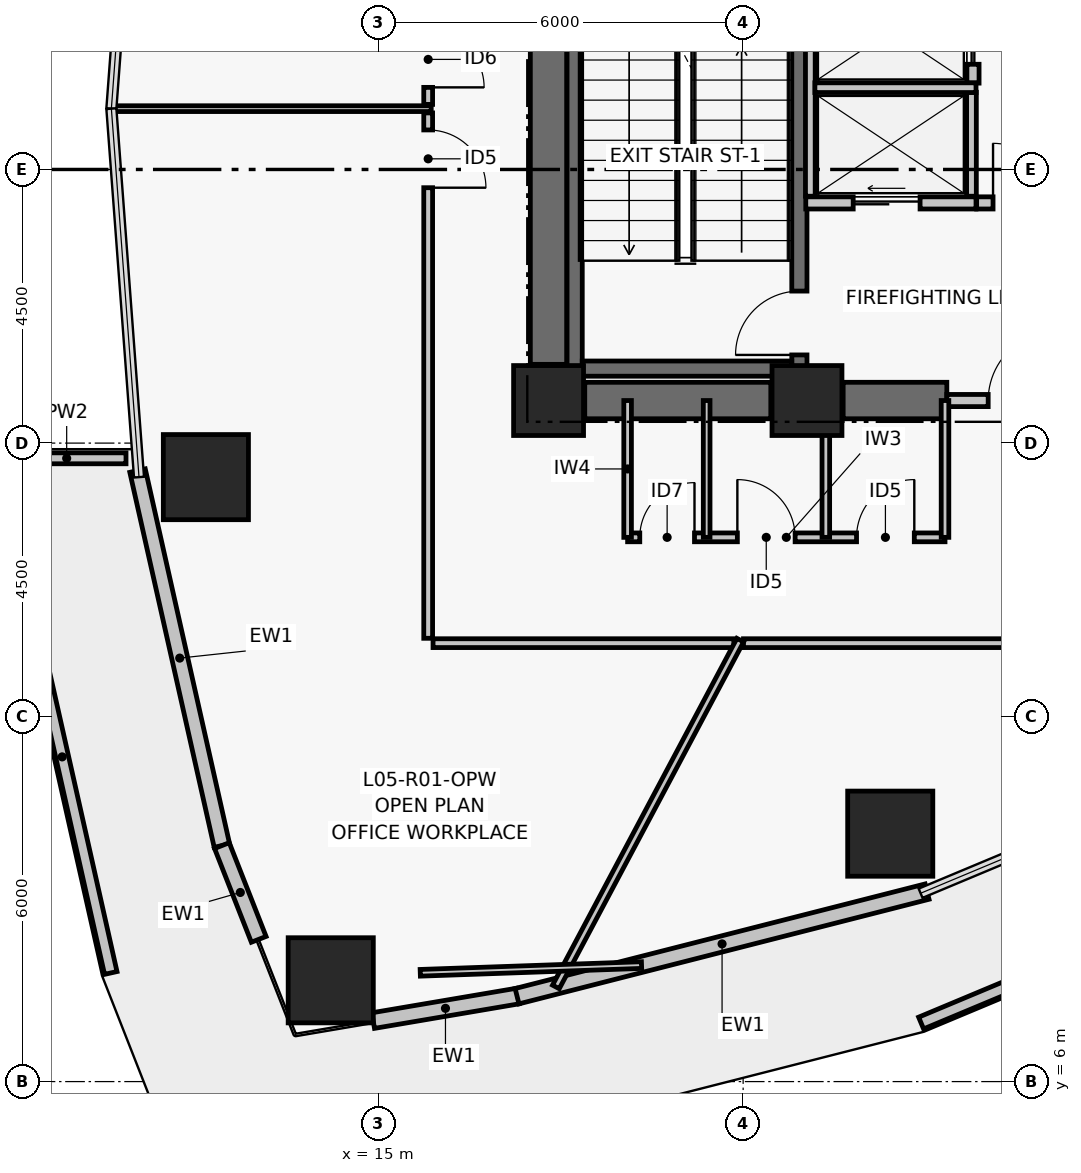
"""IFC4 building model, lengths in metres.
Left out: names, types, materials, properties, quantities, classifications, styles, units other than length and angle.
Written with IfcOpenShell. Run it as: python <this file> out.ifc"""

import sys

from ifc_helpers import new_model, si_unit, direction, frame, frame_2d, origin, origin_2d, place, context, subcontext, project, spatial, rectangle, hollow_rectangle, extrude, element, fill, save


model = new_model("IFC4")
c1 = context("Model", 3, precision=1e-05, world=origin(), true_north=direction((0.0, 1.0)))
c2 = subcontext(c1, "Body", "Model", "MODEL_VIEW")
j1 = project(units=[si_unit("LENGTHUNIT", "METRE"), si_unit("PLANEANGLEUNIT", "RADIAN")], contexts=[c1])
p1 = place(None, origin())
s1 = spatial("IfcSite", under=j1, at=p1, CompositionType="ELEMENT")
p2 = place(p1, origin())
s2 = spatial("IfcBuilding", under=s1, at=p2, CompositionType="ELEMENT")
p3 = place(p2, frame((0.0, 0.0, 27.6)))
s3 = spatial("IfcBuildingStorey", under=s2, at=p3, CompositionType="ELEMENT", Elevation=27.6)
for number, where, z_axis, x_axis in (
    (1, (17.8, 17.2, 0.0), (0.0, 0.0, 1.0), (1.0, 0.0, 0.0)),
    (2, (22.05, 17.2, 0.0), (0.0, 0.0, 1.0), (1.0, 0.0, 0.0)),
):
    element("IfcColumn", number, at=place(p3, frame(where, z_axis=z_axis, x_axis=x_axis)), inside=s3, PredefinedType="COLUMN", context=c2, shape_type="SweptSolid", body=[
        extrude(rectangle(XDim=1.15, YDim=1.15, at=origin_2d()), origin(), (0.0, 0.0, 1.0), 3.72),
    ])
p4 = place(p3, frame((18.395, 17.2, 0.0), z_axis=(0.0, 0.0, 1.0), x_axis=(1.0, 0.0, 0.0)))
e3 = element("IfcWall", 3, at=p4, inside=s3, PredefinedType="SHEAR", context=c2, shape_type="SweptSolid", body=[
    extrude(rectangle(XDim=3.06, YDim=0.6, at=frame_2d((1.53, 0.0))), origin(), (0.0, 0.0, 1.0), 3.47),
])
p5 = place(p3, frame((22.645, 17.2, 0.0), z_axis=(0.0, 0.0, 1.0), x_axis=(1.0, 0.0, 0.0)))
e4 = element("IfcWall", 4, at=p5, inside=s3, PredefinedType="SHEAR", context=c2, shape_type="SweptSolid", body=[
    extrude(rectangle(XDim=1.705, YDim=0.6, at=frame_2d((0.853, 0.0))), origin(), (0.0, 0.0, 1.0), 3.47),
])
p6 = place(p3, frame((17.8, 17.795, 0.0), z_axis=(0.0, 0.0, 1.0), x_axis=(0.0, 1.0, 0.0)))
e5 = element("IfcWall", 5, at=p6, inside=s3, PredefinedType="SHEAR", context=c2, shape_type="SweptSolid", body=[
    extrude(rectangle(XDim=8.41, YDim=0.6, at=frame_2d((4.205, 0.0))), origin(), (0.0, 0.0, 1.0), 3.47),
])
p7 = place(p3, frame((18.229, 17.6, 0.0), z_axis=(0.0, 0.0, 1.0), x_axis=(0.0, 1.0, 0.0)))
e6 = element("IfcWall", 6, at=p7, inside=s3, PredefinedType="SHEAR", context=c2, shape_type="SweptSolid", body=[
    extrude(rectangle(XDim=8.8, YDim=0.25, at=frame_2d((4.4, 0.0))), origin(), (0.0, 0.0, 1.0), 3.47),
])
p8 = place(p3, frame((21.925, 17.6, 0.0), z_axis=(0.0, 0.0, 1.0), x_axis=(0.0, 1.0, 0.0)))
e7 = element("IfcWall", 7, at=p8, inside=s3, PredefinedType="SHEAR", context=c2, shape_type="SweptSolid", body=[
    extrude(rectangle(XDim=8.8, YDim=0.25, at=frame_2d((4.4, 0.0))), origin(), (0.0, 0.0, 1.0), 3.47),
])
p9 = place(p8, frame((0.35, 0.0, 0.0)))
e8 = element("IfcOpeningElement", 8, at=p9, cuts=e7, PredefinedType="OPENING", context=c2, shape_type="SweptSolid", body=[
    extrude(rectangle(XDim=1.05, YDim=2.08, at=frame_2d((0.525, 1.04))), frame((0.0, 0.135, 0.0), z_axis=(0.0, -1.0, 0.0), x_axis=(1.0, 0.0, 0.0)), (0.0, 0.0, 1.0), 0.27),
])
p10 = place(p3, frame((18.354, 17.725, 0.0), z_axis=(0.0, 0.0, 1.0), x_axis=(1.0, 0.0, 0.0)))
e9 = element("IfcWall", 9, at=p10, inside=s3, PredefinedType="SHEAR", context=c2, shape_type="SweptSolid", body=[
    extrude(rectangle(XDim=3.446, YDim=0.25, at=frame_2d((1.723, 0.0))), origin(), (0.0, 0.0, 1.0), 3.47),
])
for number, where, z_axis, x_axis in (
    (10, (12.164, 15.94, 0.0), (0.0, 0.0, 1.0), (1.0, 0.0, 0.0)),
    (11, (14.218, 7.666, 0.0), (0.0, 0.0, 1.0), (1.0, 0.0, 0.0)),
    (12, (23.419, 10.077, 0.0), (0.0, 0.0, 1.0), (1.0, 0.0, 0.0)),
):
    element("IfcColumn", number, at=place(p3, frame(where, z_axis=z_axis, x_axis=x_axis)), inside=s3, PredefinedType="COLUMN", context=c2, shape_type="SweptSolid", body=[
        extrude(hollow_rectangle(XDim=1.4, YDim=1.4, WallThickness=0.055, at=origin_2d()), origin(), (0.0, 0.0, 1.0), 3.72),
    ])
p11 = place(p3, frame((12.427, 9.881, 0.0), z_axis=(0.0, 0.0, 1.0), x_axis=(-0.219502085231, 0.975612030768, 0.0)))
e13 = element("IfcWall", 13, at=p11, inside=s3, PredefinedType="PARTITIONING", context=c2, shape_type="SweptSolid", body=[
    extrude(rectangle(XDim=6.321, YDim=0.26, at=frame_2d((3.16, 0.0))), origin(), (0.0, 0.0, 1.0), 3.47),
])
p12 = place(p3, frame((13.033, 8.339, 0.0), z_axis=(0.0, 0.0, 1.0), x_axis=(-0.365666052462, 0.930746119023, 0.0)))
e14 = element("IfcWall", 14, at=p12, inside=s3, PredefinedType="PARTITIONING", context=c2, shape_type="SweptSolid", body=[
    extrude(rectangle(XDim=1.656, YDim=0.26, at=frame_2d((0.828, 0.0))), origin(), (0.0, 0.0, 1.0), 3.47),
])
p13 = place(p3, frame((17.293, 7.407, 0.0), z_axis=(0.0, 0.0, 1.0), x_axis=(-0.985905469923, -0.167303330437, 0.0)))
e15 = element("IfcWall", 15, at=p13, inside=s3, PredefinedType="PARTITIONING", context=c2, shape_type="SweptSolid", body=[
    extrude(rectangle(XDim=2.412, YDim=0.26, at=frame_2d((1.206, 0.0))), origin(), (0.0, 0.0, 1.0), 3.47),
])
p14 = place(p3, frame((24.025, 9.124, 0.0), z_axis=(0.0, 0.0, 1.0), x_axis=(-0.968977974408, -0.247147092057, 0.0)))
e16 = element("IfcWall", 16, at=p14, inside=s3, PredefinedType="PARTITIONING", context=c2, shape_type="SweptSolid", body=[
    extrude(rectangle(XDim=6.959, YDim=0.26, at=frame_2d((3.479, 0.0))), origin(), (0.0, 0.0, 1.0), 3.47),
])
p15 = place(p3, frame((31.173, 9.993, 0.0), z_axis=(0.0, 0.0, 1.0), x_axis=(-0.922553724433, -0.385868663582, 0.0)))
e17 = element("IfcWall", 17, at=p15, inside=s3, PredefinedType="PARAPET", context=c2, shape_type="SweptSolid", body=[
    extrude(rectangle(XDim=7.854, YDim=0.21, at=frame_2d((3.927, 0.0))), origin(), (0.0, 0.0, 1.0), 1.15),
])
p16 = place(p3, frame((10.6, 7.786, 0.0), z_axis=(0.0, 0.0, 1.0), x_axis=(-0.219520170018, 0.975607961712, 0.0)))
e18 = element("IfcWall", 18, at=p16, inside=s3, PredefinedType="PARAPET", context=c2, shape_type="SweptSolid", body=[
    extrude(rectangle(XDim=7.285, YDim=0.21, at=frame_2d((3.642, 0.0))), origin(), (0.0, 0.0, 1.0), 1.15),
])
p17 = place(p3, frame((8.899, 16.25, 0.0), z_axis=(0.0, 0.0, 1.0), x_axis=(1.0, 0.0, 0.0)))
e19 = element("IfcWall", 19, at=p17, inside=s3, PredefinedType="PARAPET", context=c2, shape_type="SweptSolid", body=[
    extrude(rectangle(XDim=1.951, YDim=0.18, at=frame_2d((0.976, 0.0))), origin(), (0.0, 0.0, 1.0), 1.15),
])
p18 = place(p3, frame((24.35, 17.2, 0.0), z_axis=(0.0, 0.0, 1.0), x_axis=(1.0, 0.0, 0.0)))
e20 = element("IfcWall", 20, at=p18, inside=s3, PredefinedType="PARTITIONING", context=c2, shape_type="SweptSolid", body=[
    extrude(rectangle(XDim=2.5, YDim=0.2, at=frame_2d((1.25, 0.0))), origin(), (0.0, 0.0, 1.0), 2.6),
])
p19 = place(p18, frame((0.68, 0.0, 0.0)))
e21 = element("IfcOpeningElement", 21, at=p19, cuts=e20, PredefinedType="OPENING", context=c2, shape_type="SweptSolid", body=[
    extrude(rectangle(XDim=1.15, YDim=2.08, at=frame_2d((0.575, 1.04))), frame((0.0, 0.11, 0.0), z_axis=(0.0, -1.0, 0.0), x_axis=(1.0, 0.0, 0.0)), (0.0, 0.0, 1.0), 0.22),
])
p20 = place(p3, frame((24.84, 20.45, 0.0), z_axis=(0.0, 0.0, 1.0), x_axis=(1.0, 0.0, 0.0)))
e22 = element("IfcWall", 22, at=p20, inside=s3, PredefinedType="PARTITIONING", context=c2, shape_type="SweptSolid", body=[
    extrude(rectangle(XDim=1.52, YDim=0.2, at=frame_2d((0.76, 0.0))), origin(), (0.0, 0.0, 1.0), 3.47),
])
p21 = place(p20, frame((0.27, 0.0, 0.0)))
e23 = element("IfcOpeningElement", 23, at=p21, cuts=e22, PredefinedType="OPENING", context=c2, shape_type="SweptSolid", body=[
    extrude(rectangle(XDim=0.98, YDim=2.06, at=frame_2d((0.49, 1.03))), frame((0.0, 0.11, 0.0), z_axis=(0.0, -1.0, 0.0), x_axis=(1.0, 0.0, 0.0)), (0.0, 0.0, 1.0), 0.22),
])
p22 = place(p3, frame((22.03, 20.45, 0.0), z_axis=(0.0, 0.0, 1.0), x_axis=(1.0, 0.0, 0.0)))
e24 = element("IfcWall", 24, at=p22, inside=s3, PredefinedType="PARTITIONING", context=c2, shape_type="SweptSolid", body=[
    extrude(rectangle(XDim=2.8, YDim=0.2, at=frame_2d((1.4, 0.0))), origin(), (0.0, 0.0, 1.0), 3.47),
])
p23 = place(p22, frame((0.78, 0.0, 0.0)))
e25 = element("IfcOpeningElement", 25, at=p23, cuts=e24, PredefinedType="OPENING", context=c2, shape_type="SweptSolid", body=[
    extrude(rectangle(XDim=1.1, YDim=2.08, at=frame_2d((0.55, 1.04))), frame((0.0, 0.11, 0.0), z_axis=(0.0, -1.0, 0.0), x_axis=(1.0, 0.0, 0.0)), (0.0, 0.0, 1.0), 0.22),
])
p24 = place(p3, frame((24.78, 22.42, 0.0), z_axis=(0.0, 0.0, 1.0), x_axis=(0.0, 1.0, 0.0)))
e26 = element("IfcWall", 26, at=p24, inside=s3, PredefinedType="PARTITIONING", context=c2, shape_type="SweptSolid", body=[
    extrude(rectangle(XDim=1.72, YDim=0.2, at=frame_2d((0.86, 0.0))), origin(), (0.0, 0.0, 1.0), 3.47),
])
p25 = place(p24, frame((0.31, 0.0, 0.0)))
e27 = element("IfcOpeningElement", 27, at=p25, cuts=e26, PredefinedType="OPENING", context=c2, shape_type="SweptSolid", body=[
    extrude(rectangle(XDim=1.1, YDim=2.08, at=frame_2d((0.55, 1.04))), frame((0.0, 0.11, 0.0), z_axis=(0.0, -1.0, 0.0), x_axis=(1.0, 0.0, 0.0)), (0.0, 0.0, 1.0), 0.22),
])
p26 = place(p3, frame((22.105, 20.56, 0.0), z_axis=(0.0, 0.0, 1.0), x_axis=(0.0, 1.0, 0.0)))
e28 = element("IfcWall", 28, at=p26, inside=s3, PredefinedType="PARTITIONING", context=c2, shape_type="SweptSolid", body=[
    extrude(rectangle(XDim=5.45, YDim=0.16, at=frame_2d((2.725, 0.0))), origin(), (0.0, 0.0, 1.0), 3.47),
])
p27 = place(p3, frame((24.755, 20.56, 0.0), z_axis=(0.0, 0.0, 1.0), x_axis=(0.0, 1.0, 0.0)))
e29 = element("IfcWall", 29, at=p27, inside=s3, PredefinedType="PARTITIONING", context=c2, shape_type="SweptSolid", body=[
    extrude(rectangle(XDim=1.71, YDim=0.16, at=frame_2d((0.855, 0.0))), origin(), (0.0, 0.0, 1.0), 3.47),
])
p28 = place(p3, frame((22.18, 22.345, 0.0), z_axis=(0.0, 0.0, 1.0), x_axis=(1.0, 0.0, 0.0)))
e30 = element("IfcWall", 30, at=p28, inside=s3, PredefinedType="PARTITIONING", context=c2, shape_type="SweptSolid", body=[
    extrude(rectangle(XDim=2.65, YDim=0.16, at=frame_2d((1.325, 0.0))), origin(), (0.0, 0.0, 1.0), 3.47),
])
p29 = place(p3, frame((19.1, 14.95, 0.0), z_axis=(0.0, 0.0, 1.0), x_axis=(1.0, 0.0, 0.0)))
e31 = element("IfcWall", 31, at=p29, inside=s3, PredefinedType="PARTITIONING", context=c2, shape_type="SweptSolid", body=[
    extrude(rectangle(XDim=5.22, YDim=0.145, at=frame_2d((2.61, 0.0))), origin(), (0.0, 0.0, 1.0), 2.6),
])
p30 = place(p29, frame((0.2, 0.0, 0.0)))
e32 = element("IfcOpeningElement", 32, at=p30, cuts=e31, PredefinedType="OPENING", context=c2, shape_type="SweptSolid", body=[
    extrude(rectangle(XDim=0.9, YDim=2.02, at=frame_2d((0.45, 1.01))), frame((0.0, 0.083, 0.0), z_axis=(0.0, -1.0, 0.0), x_axis=(1.0, 0.0, 0.0)), (0.0, 0.0, 1.0), 0.165),
])
p31 = place(p29, frame((1.805, 0.0, 0.0)))
e33 = element("IfcOpeningElement", 33, at=p31, cuts=e31, PredefinedType="OPENING", context=c2, shape_type="SweptSolid", body=[
    extrude(rectangle(XDim=0.95, YDim=2.06, at=frame_2d((0.475, 1.03))), frame((0.0, 0.083, 0.0), z_axis=(0.0, -1.0, 0.0), x_axis=(1.0, 0.0, 0.0)), (0.0, 0.0, 1.0), 0.165),
])
p32 = place(p29, frame((3.765, 0.0, 0.0)))
e34 = element("IfcOpeningElement", 34, at=p32, cuts=e31, PredefinedType="OPENING", context=c2, shape_type="SweptSolid", body=[
    extrude(rectangle(XDim=0.95, YDim=2.06, at=frame_2d((0.475, 1.03))), frame((0.0, 0.083, 0.0), z_axis=(0.0, -1.0, 0.0), x_axis=(1.0, 0.0, 0.0)), (0.0, 0.0, 1.0), 0.165),
])
p33 = place(p3, frame((19.1, 14.95, 0.0), z_axis=(0.0, 0.0, 1.0), x_axis=(0.0, 1.0, 0.0)))
e35 = element("IfcWall", 35, at=p33, inside=s3, PredefinedType="PARTITIONING", context=c2, shape_type="SweptSolid", body=[
    extrude(rectangle(XDim=2.25, YDim=0.125, at=frame_2d((1.125, 0.0))), origin(), (0.0, 0.0, 1.0), 2.6),
])
p34 = place(p3, frame((20.4, 14.95, 0.0), z_axis=(0.0, 0.0, 1.0), x_axis=(0.0, 1.0, 0.0)))
e36 = element("IfcWall", 36, at=p34, inside=s3, PredefinedType="PARTITIONING", context=c2, shape_type="SweptSolid", body=[
    extrude(rectangle(XDim=2.25, YDim=0.11, at=frame_2d((1.125, 0.0))), origin(), (0.0, 0.0, 1.0), 2.6),
])
for number, where, z_axis, x_axis in (
    (37, (22.36, 14.95, 0.0), (0.0, 0.0, 1.0), (0.0, 1.0, 0.0)),
    (38, (24.32, 14.95, 0.0), (0.0, 0.0, 1.0), (0.0, 1.0, 0.0)),
):
    element("IfcWall", number, at=place(p3, frame(where, z_axis=z_axis, x_axis=x_axis)), inside=s3, PredefinedType="PARTITIONING", context=c2, shape_type="SweptSolid", body=[
        extrude(rectangle(XDim=2.25, YDim=0.125, at=frame_2d((1.125, 0.0))), origin(), (0.0, 0.0, 1.0), 2.6),
    ])
p35 = place(p3, frame((15.82, 21.93, 0.0), z_axis=(0.0, 0.0, 1.0), x_axis=(0.0, -1.0, 0.0)))
e39 = element("IfcWall", 39, at=p35, inside=s3, PredefinedType="PARTITIONING", context=c2, shape_type="SweptSolid", body=[
    extrude(rectangle(XDim=8.64, YDim=0.145, at=frame_2d((4.32, 0.0))), origin(), (0.0, 0.0, 1.0), 2.6),
])
p36 = place(p35, frame((0.28, 0.0, 0.0)))
e40 = element("IfcOpeningElement", 40, at=p36, cuts=e39, PredefinedType="OPENING", context=c2, shape_type="SweptSolid", body=[
    extrude(rectangle(XDim=0.95, YDim=2.06, at=frame_2d((0.475, 1.03))), frame((0.0, 0.083, 0.0), z_axis=(0.0, -1.0, 0.0), x_axis=(1.0, 0.0, 0.0)), (0.0, 0.0, 1.0), 0.165),
])
p37 = place(p3, frame((15.9, 13.21, 0.0), z_axis=(0.0, 0.0, 1.0), x_axis=(1.0, 0.0, 0.0)))
e41 = element("IfcWall", 41, at=p37, inside=s3, PredefinedType="PARTITIONING", context=c2, shape_type="SweptSolid", body=[
    extrude(rectangle(XDim=4.947, YDim=0.145, at=frame_2d((2.474, 0.0))), origin(), (0.0, 0.0, 1.0), 2.6),
])
p38 = place(p3, frame((21.006, 13.21, 0.0), z_axis=(0.0, 0.0, 1.0), x_axis=(1.0, 0.0, 0.0)))
e42 = element("IfcWall", 42, at=p38, inside=s3, PredefinedType="PARTITIONING", context=c2, shape_type="SweptSolid", body=[
    extrude(rectangle(XDim=10.144, YDim=0.145, at=frame_2d((5.072, 0.0))), origin(), (0.0, 0.0, 1.0), 2.6),
])
p39 = place(p38, frame((5.677, 0.0, 0.0)))
e43 = element("IfcOpeningElement", 43, at=p39, cuts=e42, PredefinedType="OPENING", context=c2, shape_type="SweptSolid", body=[
    extrude(rectangle(XDim=0.95, YDim=2.06, at=frame_2d((0.475, 1.03))), frame((0.0, 0.083, 0.0), z_axis=(0.0, -1.0, 0.0), x_axis=(1.0, 0.0, 0.0)), (0.0, 0.0, 1.0), 0.165),
])
p40 = place(p3, frame((15.82, 28.7, 0.0), z_axis=(0.0, 0.0, 1.0), x_axis=(0.0, -1.0, 0.0)))
e44 = element("IfcWall", 44, at=p40, inside=s3, PredefinedType="PARTITIONING", context=c2, shape_type="SweptSolid", body=[
    extrude(rectangle(XDim=6.63, YDim=0.145, at=frame_2d((3.315, 0.0))), origin(), (0.0, 0.0, 1.0), 2.6),
])
p41 = place(p40, frame((5.43, 0.0, 0.0)))
e45 = element("IfcOpeningElement", 45, at=p41, cuts=e44, PredefinedType="OPENING", context=c2, shape_type="SweptSolid", body=[
    extrude(rectangle(XDim=0.92, YDim=2.05, at=frame_2d((0.46, 1.025))), frame((0.0, 0.083, 0.0), z_axis=(0.0, -1.0, 0.0), x_axis=(1.0, 0.0, 0.0)), (0.0, 0.0, 1.0), 0.165),
])
p42 = place(p3, frame((15.87, 22.0, 0.0), z_axis=(0.0, 0.0, 1.0), x_axis=(-1.0, 0.0, 0.0)))
e46 = element("IfcWall", 46, at=p42, inside=s3, PredefinedType="PARTITIONING", context=c2, shape_type="SweptSolid", body=[
    extrude(rectangle(XDim=5.271, YDim=0.095, at=frame_2d((2.635, 0.0))), origin(), (0.0, 0.0, 1.0), 2.85),
])
p43 = place(p3, frame((20.953, 13.26, 0.0), z_axis=(0.0, 0.0, 1.0), x_axis=(-0.469479450278, -0.88294339896, 0.0)))
e47 = element("IfcWall", 47, at=p43, inside=s3, PredefinedType="PARTITIONING", context=c2, shape_type="SweptSolid", body=[
    extrude(rectangle(XDim=6.459, YDim=0.125, at=frame_2d((3.229, 0.0))), origin(), (0.0, 0.0, 1.0), 2.85),
])
p44 = place(p3, frame((15.69, 7.789, 0.0), z_axis=(0.0, 0.0, 1.0), x_axis=(0.999389725088, 0.03493103762, 0.0)))
e48 = element("IfcWall", 48, at=p44, inside=s3, PredefinedType="PARTITIONING", context=c2, shape_type="SweptSolid", body=[
    extrude(rectangle(XDim=3.641, YDim=0.11, at=frame_2d((1.821, 0.0))), origin(), (0.0, 0.0, 1.0), 3.47),
])
p45 = place(p9, origin())
e49 = element("IfcDoor", 49, at=p45, inside=s3, OperationType="SINGLE_SWING_LEFT", PredefinedType="DOOR", context=c2, shape_type="SweptSolid", body=[
    extrude(rectangle(XDim=1.05, YDim=2.08, at=frame_2d((0.525, 1.04))), frame((0.0, 0.025, 0.0), z_axis=(0.0, -1.0, 0.0), x_axis=(1.0, 0.0, 0.0)), (0.0, 0.0, 1.0), 0.05),
])
fill(e8, e49)
p46 = place(p19, origin())
e50 = element("IfcDoor", 50, at=p46, inside=s3, OperationType="SINGLE_SWING_RIGHT", PredefinedType="DOOR", context=c2, shape_type="SweptSolid", body=[
    extrude(rectangle(XDim=1.15, YDim=2.08, at=frame_2d((0.575, 1.04))), frame((0.0, 0.025, 0.0), z_axis=(0.0, -1.0, 0.0), x_axis=(1.0, 0.0, 0.0)), (0.0, 0.0, 1.0), 0.05),
])
fill(e21, e50)
p47 = place(p21, origin())
e51 = element("IfcDoor", 51, at=p47, inside=s3, OperationType="SINGLE_SWING_LEFT", PredefinedType="DOOR", context=c2, shape_type="SweptSolid", body=[
    extrude(rectangle(XDim=0.98, YDim=2.06, at=frame_2d((0.49, 1.03))), frame((0.0, 0.025, 0.0), z_axis=(0.0, -1.0, 0.0), x_axis=(1.0, 0.0, 0.0)), (0.0, 0.0, 1.0), 0.05),
])
fill(e23, e51)
p48 = place(p23, origin())
e52 = element("IfcDoor", 52, at=p48, inside=s3, OperationType="DOUBLE_DOOR_SLIDING", PredefinedType="DOOR", context=c2, shape_type="SweptSolid", body=[
    extrude(rectangle(XDim=1.1, YDim=2.08, at=frame_2d((0.55, 1.04))), frame((0.0, 0.025, 0.0), z_axis=(0.0, -1.0, 0.0), x_axis=(1.0, 0.0, 0.0)), (0.0, 0.0, 1.0), 0.05),
])
fill(e25, e52)
p49 = place(p25, origin())
e53 = element("IfcDoor", 53, at=p49, inside=s3, OperationType="DOUBLE_DOOR_SLIDING", PredefinedType="DOOR", context=c2, shape_type="SweptSolid", body=[
    extrude(rectangle(XDim=1.1, YDim=2.08, at=frame_2d((0.55, 1.04))), frame((0.0, 0.025, 0.0), z_axis=(0.0, -1.0, 0.0), x_axis=(1.0, 0.0, 0.0)), (0.0, 0.0, 1.0), 0.05),
])
fill(e27, e53)
p50 = place(p30, origin())
e54 = element("IfcDoor", 54, at=p50, inside=s3, OperationType="SINGLE_SWING_RIGHT", PredefinedType="DOOR", context=c2, shape_type="SweptSolid", body=[
    extrude(rectangle(XDim=0.9, YDim=2.02, at=frame_2d((0.45, 1.01))), frame((0.0, 0.025, 0.0), z_axis=(0.0, -1.0, 0.0), x_axis=(1.0, 0.0, 0.0)), (0.0, 0.0, 1.0), 0.05),
])
fill(e32, e54)
p51 = place(p31, origin())
e55 = element("IfcDoor", 55, at=p51, inside=s3, OperationType="SINGLE_SWING_LEFT", PredefinedType="DOOR", context=c2, shape_type="SweptSolid", body=[
    extrude(rectangle(XDim=0.95, YDim=2.06, at=frame_2d((0.475, 1.03))), frame((0.0, 0.025, 0.0), z_axis=(0.0, -1.0, 0.0), x_axis=(1.0, 0.0, 0.0)), (0.0, 0.0, 1.0), 0.05),
])
fill(e33, e55)
p52 = place(p32, origin())
e56 = element("IfcDoor", 56, at=p52, inside=s3, OperationType="SINGLE_SWING_RIGHT", PredefinedType="DOOR", context=c2, shape_type="SweptSolid", body=[
    extrude(rectangle(XDim=0.95, YDim=2.06, at=frame_2d((0.475, 1.03))), frame((0.0, 0.025, 0.0), z_axis=(0.0, -1.0, 0.0), x_axis=(1.0, 0.0, 0.0)), (0.0, 0.0, 1.0), 0.05),
])
fill(e34, e56)
p53 = place(p36, origin())
e57 = element("IfcDoor", 57, at=p53, inside=s3, OperationType="SINGLE_SWING_RIGHT", PredefinedType="DOOR", context=c2, shape_type="SweptSolid", body=[
    extrude(rectangle(XDim=0.95, YDim=2.06, at=frame_2d((0.475, 1.03))), frame((0.0, 0.025, 0.0), z_axis=(0.0, -1.0, 0.0), x_axis=(1.0, 0.0, 0.0)), (0.0, 0.0, 1.0), 0.05),
])
fill(e40, e57)
p54 = place(p41, origin())
e58 = element("IfcDoor", 58, at=p54, inside=s3, OperationType="SINGLE_SWING_RIGHT", PredefinedType="DOOR", context=c2, shape_type="SweptSolid", body=[
    extrude(rectangle(XDim=0.92, YDim=2.05, at=frame_2d((0.46, 1.025))), frame((0.0, 0.025, 0.0), z_axis=(0.0, -1.0, 0.0), x_axis=(1.0, 0.0, 0.0)), (0.0, 0.0, 1.0), 0.05),
])
fill(e45, e58)
save(model, sys.argv[1])
